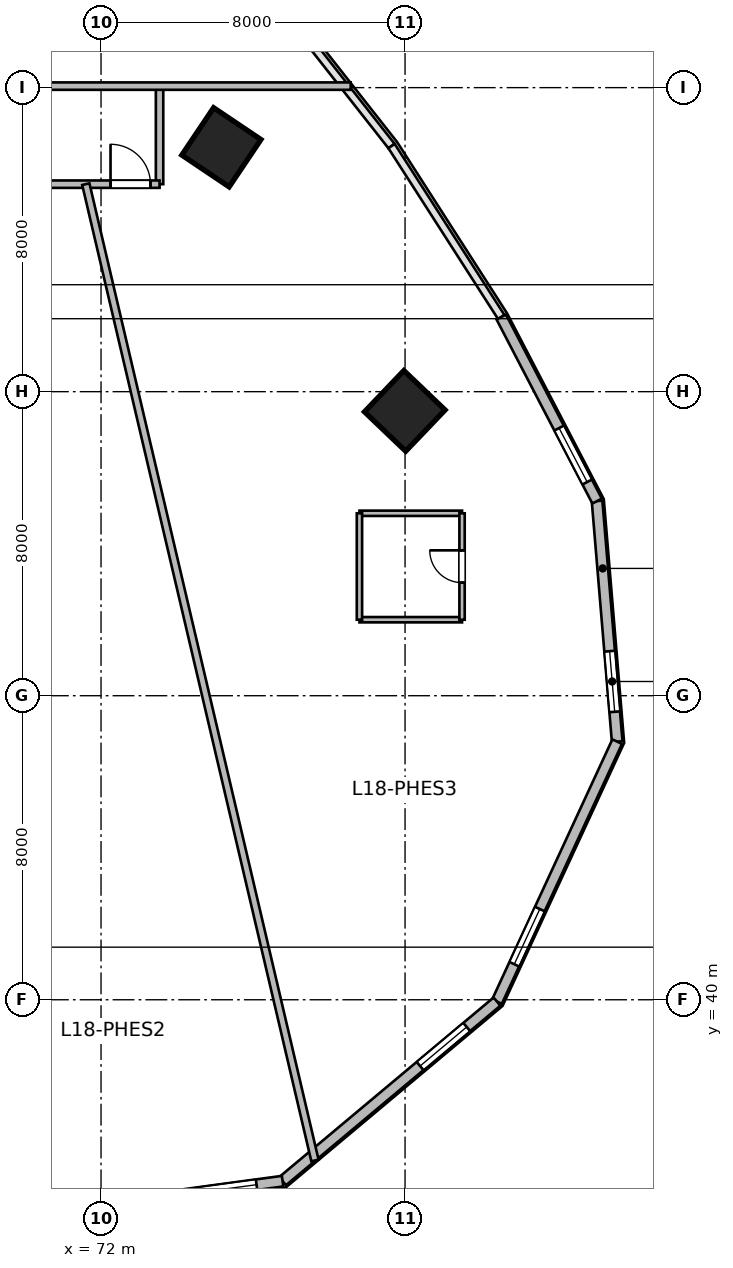
"""IFC4 building model, lengths in metres.
Left out: names, types, materials, properties, quantities, classifications, styles, units other than length and angle.
Written with IfcOpenShell. Run it as: python <this file> out.ifc"""

import sys

from ifc_helpers import new_model, si_unit, direction, frame, frame_2d, origin, origin_2d, place, context, subcontext, project, spatial, rectangle, extrude, source, transform, mapped, element, fill, save


model = new_model("IFC4")
c1 = context("Model", 3, precision=1e-05, world=origin(), true_north=direction((0.0, 1.0)))
c2 = subcontext(c1, "Body", "Model", "MODEL_VIEW")
j1 = project(units=[si_unit("LENGTHUNIT", "METRE"), si_unit("PLANEANGLEUNIT", "RADIAN")], contexts=[c1])
p1 = place(None, origin())
s1 = spatial("IfcSite", under=j1, at=p1, CompositionType="ELEMENT")
p2 = place(p1, origin())
s2 = spatial("IfcBuilding", under=s1, at=p2, CompositionType="ELEMENT")
p3 = place(p2, frame((0.0, 0.0, 78.6)))
s3 = spatial("IfcBuildingStorey", under=s2, at=p3, CompositionType="ELEMENT", Elevation=78.6)
m1 = source(origin(), c2, "Body", "SweptSolid", [
    extrude(rectangle(XDim=1.5, YDim=1.5, at=origin_2d()), origin(), (0.0, 0.0, 1.0), 3.6),
])
for number, where, z_axis, x_axis in (
    (1, (75.167, 62.43, 0.0), (0.0, 0.0, 1.0), (0.558, 0.83, 0.0)),
    (2, (79.993, 55.494, 0.0), (0.0, 0.0, 1.0), (0.691, 0.723, 0.0)),
):
    element("IfcColumn", number, at=place(p3, frame(where, z_axis=z_axis, x_axis=x_axis)), inside=s3, PredefinedType="COLUMN", context=c2, shape_type="MappedRepresentation", body=[
        mapped(m1, transform((0.0, 0.0, 0.0), scale=1.0)),
    ])
m2 = source(origin(), c2, "Body", "SweptSolid", [
    extrude(rectangle(XDim=6.353, YDim=0.28, at=frame_2d((3.176, 0.0))), origin(), (0.0, 0.0, 1.0), 3.36),
])
p4 = place(p3, frame((85.053, 53.122, 0.0), z_axis=(0.0, 0.0, 1.0), x_axis=(0.083319001377, -0.996522926986, 0.0)))
e3 = element("IfcWall", 3, at=p4, inside=s3, PredefinedType="SOLIDWALL", context=c2, shape_type="MappedRepresentation", body=[
    mapped(m2, transform((0.0, 0.0, 0.0), scale=1.0)),
])
p5 = place(p4, frame((3.964, 0.0, 0.95)))
e4 = element("IfcOpeningElement", 4, at=p5, cuts=e3, PredefinedType="OPENING", context=c2, shape_type="SweptSolid", body=[
    extrude(rectangle(XDim=1.6, YDim=1.9, at=frame_2d((0.8, 0.95))), frame((0.0, 0.15, 0.0), z_axis=(0.0, -1.0, 0.0), x_axis=(1.0, 0.0, 0.0)), (0.0, 0.0, 1.0), 0.3),
])
m3 = source(origin(), c2, "Body", "SweptSolid", [
    extrude(rectangle(XDim=7.536, YDim=0.28, at=frame_2d((3.768, 0.0))), origin(), (0.0, 0.0, 1.0), 3.36),
])
p6 = place(p3, frame((85.582, 46.792, 0.0), z_axis=(0.0, 0.0, 1.0), x_axis=(-0.41964973873, -0.907686122393, 0.0)))
e5 = element("IfcWall", 5, at=p6, inside=s3, PredefinedType="SOLIDWALL", context=c2, shape_type="MappedRepresentation", body=[
    mapped(m3, transform((0.0, 0.0, 0.0), scale=1.0)),
])
p7 = place(p6, frame((4.852, 0.0, 0.95)))
e6 = element("IfcOpeningElement", 6, at=p7, cuts=e5, PredefinedType="OPENING", context=c2, shape_type="SweptSolid", body=[
    extrude(rectangle(XDim=1.6, YDim=1.9, at=frame_2d((0.8, 0.95))), frame((0.0, 0.15, 0.0), z_axis=(0.0, -1.0, 0.0), x_axis=(1.0, 0.0, 0.0)), (0.0, 0.0, 1.0), 0.3),
])
m4 = source(origin(), c2, "Body", "SweptSolid", [
    extrude(rectangle(XDim=7.359, YDim=0.28, at=frame_2d((3.679, 0.0))), origin(), (0.0, 0.0, 1.0), 3.36),
])
p8 = place(p3, frame((82.42, 39.951, 0.0), z_axis=(0.0, 0.0, 1.0), x_axis=(-0.766737165543, -0.641961150675, 0.0)))
e7 = element("IfcWall", 7, at=p8, inside=s3, PredefinedType="SOLIDWALL", context=c2, shape_type="MappedRepresentation", body=[
    mapped(m4, transform((0.0, 0.0, 0.0), scale=1.0)),
])
p9 = place(p8, frame((1.04, 0.0, 0.95)))
e8 = element("IfcOpeningElement", 8, at=p9, cuts=e7, PredefinedType="OPENING", context=c2, shape_type="SweptSolid", body=[
    extrude(rectangle(XDim=1.6, YDim=1.9, at=frame_2d((0.8, 0.95))), frame((0.0, 0.15, 0.0), z_axis=(0.0, -1.0, 0.0), x_axis=(1.0, 0.0, 0.0)), (0.0, 0.0, 1.0), 0.3),
])
m5 = source(origin(), c2, "Body", "SweptSolid", [
    extrude(rectangle(XDim=5.967, YDim=0.28, at=frame_2d((2.984, 0.0))), origin(), (0.0, 0.0, 1.0), 3.36),
])
p10 = place(p3, frame((76.777, 35.227, 0.0), z_axis=(0.0, 0.0, 1.0), x_axis=(-0.990927009341, -0.134401124099, 0.0)))
e9 = element("IfcWall", 9, at=p10, inside=s3, PredefinedType="SOLIDWALL", context=c2, shape_type="MappedRepresentation", body=[
    mapped(m5, transform((0.0, 0.0, 0.0), scale=1.0)),
])
p11 = place(p10, frame((0.692, 0.0, 0.95)))
e10 = element("IfcOpeningElement", 10, at=p11, cuts=e9, PredefinedType="OPENING", context=c2, shape_type="SweptSolid", body=[
    extrude(rectangle(XDim=1.6, YDim=1.9, at=frame_2d((0.8, 0.95))), frame((0.0, 0.15, 0.0), z_axis=(0.0, -1.0, 0.0), x_axis=(1.0, 0.0, 0.0)), (0.0, 0.0, 1.0), 0.3),
])
m6 = source(origin(), c2, "Body", "SweptSolid", [
    extrude(rectangle(XDim=5.222, YDim=0.28, at=frame_2d((2.611, 0.0))), origin(), (0.0, 0.0, 1.0), 3.36),
])
p12 = place(p3, frame((70.864, 34.425, 0.0), z_axis=(0.0, 0.0, 1.0), x_axis=(-0.761900099546, 0.647694556339, 0.0)))
e11 = element("IfcWall", 11, at=p12, inside=s3, PredefinedType="SOLIDWALL", context=c2, shape_type="MappedRepresentation", body=[
    mapped(m6, transform((0.0, 0.0, 0.0), scale=1.0)),
])
p13 = place(p12, frame((0.506, 0.0, 0.95)))
e12 = element("IfcOpeningElement", 12, at=p13, cuts=e11, PredefinedType="OPENING", context=c2, shape_type="SweptSolid", body=[
    extrude(rectangle(XDim=1.6, YDim=1.9, at=frame_2d((0.8, 0.95))), frame((0.0, 0.15, 0.0), z_axis=(0.0, -1.0, 0.0), x_axis=(1.0, 0.0, 0.0)), (0.0, 0.0, 1.0), 0.3),
])
m7 = source(origin(), c2, "Body", "SweptSolid", [
    extrude(rectangle(XDim=5.459, YDim=0.28, at=frame_2d((2.73, 0.0))), origin(), (0.0, 0.0, 1.0), 3.36),
])
p14 = place(p3, frame((82.532, 57.965, 0.0), z_axis=(0.0, 0.0, 1.0), x_axis=(0.461768054321, -0.887000712518, 0.0)))
e13 = element("IfcWall", 13, at=p14, inside=s3, PredefinedType="SOLIDWALL", context=c2, shape_type="MappedRepresentation", body=[
    mapped(m7, transform((0.0, 0.0, 0.0), scale=1.0)),
])
p15 = place(p14, frame((3.295, 0.0, 0.95)))
e14 = element("IfcOpeningElement", 14, at=p15, cuts=e13, PredefinedType="OPENING", context=c2, shape_type="SweptSolid", body=[
    extrude(rectangle(XDim=1.6, YDim=1.9, at=frame_2d((0.8, 0.95))), frame((0.0, 0.15, 0.0), z_axis=(0.0, -1.0, 0.0), x_axis=(1.0, 0.0, 0.0)), (0.0, 0.0, 1.0), 0.3),
])
m8 = source(origin(), c2, "Body", "SweptSolid", [
    extrude(rectangle(XDim=2.58, YDim=0.195, at=frame_2d((1.29, 0.0))), origin(), (0.0, 0.0, 1.0), 2.88),
])
p16 = place(p3, frame((73.54, 61.46, 0.0), z_axis=(0.0, 0.0, 1.0), x_axis=(0.0, 1.0, 0.0)))
e15 = element("IfcWall", 15, at=p16, inside=s3, PredefinedType="PARTITIONING", context=c2, shape_type="MappedRepresentation", body=[
    mapped(m8, transform((0.0, 0.0, 0.0), scale=1.0)),
])
m9 = source(origin(), c2, "Body", "SweptSolid", [
    extrude(rectangle(XDim=16.93, YDim=0.195, at=frame_2d((8.465, 0.0))), origin(), (0.0, 0.0, 1.0), 3.36),
])
p17 = place(p3, frame((61.64, 64.04, 0.0), z_axis=(0.0, 0.0, 1.0), x_axis=(1.0, 0.0, 0.0)))
e16 = element("IfcWall", 16, at=p17, inside=s3, PredefinedType="PARTITIONING", context=c2, shape_type="MappedRepresentation", body=[
    mapped(m9, transform((0.0, 0.0, 0.0), scale=1.0)),
])
p18 = place(p17, frame((7.94, 0.0, 0.0)))
e17 = element("IfcOpeningElement", 17, at=p18, cuts=e16, PredefinedType="OPENING", context=c2, shape_type="SweptSolid", body=[
    extrude(rectangle(XDim=1.05, YDim=2.15, at=frame_2d((0.525, 1.075))), frame((0.0, 0.107, 0.0), z_axis=(0.0, -1.0, 0.0), x_axis=(1.0, 0.0, 0.0)), (0.0, 0.0, 1.0), 0.215),
])
m10 = source(origin(), c2, "Body", "SweptSolid", [
    extrude(rectangle(XDim=11.9, YDim=0.195, at=frame_2d((5.95, 0.0))), origin(), (0.0, 0.0, 1.0), 3.36),
])
p19 = place(p3, frame((61.64, 61.46, 0.0), z_axis=(0.0, 0.0, 1.0), x_axis=(1.0, 0.0, 0.0)))
e18 = element("IfcWall", 18, at=p19, inside=s3, PredefinedType="PARTITIONING", context=c2, shape_type="MappedRepresentation", body=[
    mapped(m10, transform((0.0, 0.0, 0.0), scale=1.0)),
])
p20 = place(p19, frame((3.61, 0.0, 0.0)))
e19 = element("IfcOpeningElement", 19, at=p20, cuts=e18, PredefinedType="OPENING", context=c2, shape_type="SweptSolid", body=[
    extrude(rectangle(XDim=1.05, YDim=2.15, at=frame_2d((0.525, 1.075))), frame((0.0, 0.107, 0.0), z_axis=(0.0, -1.0, 0.0), x_axis=(1.0, 0.0, 0.0)), (0.0, 0.0, 1.0), 0.215),
])
p21 = place(p19, frame((5.425, 0.0, 0.0)))
e20 = element("IfcOpeningElement", 20, at=p21, cuts=e18, PredefinedType="OPENING", context=c2, shape_type="SweptSolid", body=[
    extrude(rectangle(XDim=1.05, YDim=2.15, at=frame_2d((0.525, 1.075))), frame((0.0, 0.107, 0.0), z_axis=(0.0, -1.0, 0.0), x_axis=(1.0, 0.0, 0.0)), (0.0, 0.0, 1.0), 0.215),
])
p22 = place(p19, frame((10.61, 0.0, 0.0)))
e21 = element("IfcOpeningElement", 21, at=p22, cuts=e18, PredefinedType="OPENING", context=c2, shape_type="SweptSolid", body=[
    extrude(rectangle(XDim=1.05, YDim=2.15, at=frame_2d((0.525, 1.075))), frame((0.0, 0.107, 0.0), z_axis=(0.0, -1.0, 0.0), x_axis=(1.0, 0.0, 0.0)), (0.0, 0.0, 1.0), 0.215),
])
m11 = source(origin(), c2, "Body", "SweptSolid", [
    extrude(rectangle(XDim=26.387, YDim=0.195, at=frame_2d((13.194, 0.0))), origin(), (0.0, 0.0, 1.0), 2.88),
])
p23 = place(p3, frame((77.629, 35.771, 0.0), z_axis=(0.0, 0.0, 1.0), x_axis=(-0.228490600532, 0.97354611882, 0.0)))
e22 = element("IfcWall", 22, at=p23, inside=s3, PredefinedType="PARTITIONING", context=c2, shape_type="MappedRepresentation", body=[
    mapped(m11, transform((0.0, 0.0, 0.0), scale=1.0)),
])
m12 = source(origin(), c2, "Body", "SweptSolid", [
    extrude(rectangle(XDim=2.7, YDim=0.14, at=frame_2d((1.35, 0.0))), origin(), (0.0, 0.0, 1.0), 3.36),
])
for number, where, z_axis, x_axis in (
    (23, (78.8, 52.8, 0.0), (0.0, 0.0, 1.0), (1.0, 0.0, 0.0)),
    (24, (78.8, 50.0, 0.0), (0.0, 0.0, 1.0), (1.0, 0.0, 0.0)),
):
    element("IfcWall", number, at=place(p3, frame(where, z_axis=z_axis, x_axis=x_axis)), inside=s3, PredefinedType="PARTITIONING", context=c2, shape_type="MappedRepresentation", body=[
        mapped(m12, transform((0.0, 0.0, 0.0), scale=1.0)),
    ])
m13 = source(origin(), c2, "Body", "SweptSolid", [
    extrude(rectangle(XDim=2.8, YDim=0.14, at=frame_2d((1.4, 0.0))), origin(), (0.0, 0.0, 1.0), 3.36),
])
p24 = place(p3, frame((78.8, 50.0, 0.0), z_axis=(0.0, 0.0, 1.0), x_axis=(0.0, 1.0, 0.0)))
e25 = element("IfcWall", 25, at=p24, inside=s3, PredefinedType="PARTITIONING", context=c2, shape_type="MappedRepresentation", body=[
    mapped(m13, transform((0.0, 0.0, 0.0), scale=1.0)),
])
p25 = place(p3, frame((81.5, 50.0, 0.0), z_axis=(0.0, 0.0, 1.0), x_axis=(0.0, 1.0, 0.0)))
e26 = element("IfcWall", 26, at=p25, inside=s3, PredefinedType="PARTITIONING", context=c2, shape_type="MappedRepresentation", body=[
    mapped(m13, transform((0.0, 0.0, 0.0), scale=1.0)),
])
p26 = place(p25, frame((0.975, 0.0, 0.0)))
e27 = element("IfcOpeningElement", 27, at=p26, cuts=e26, PredefinedType="OPENING", context=c2, shape_type="SweptSolid", body=[
    extrude(rectangle(XDim=0.85, YDim=2.05, at=frame_2d((0.425, 1.025))), frame((0.0, 0.08, 0.0), z_axis=(0.0, -1.0, 0.0), x_axis=(1.0, 0.0, 0.0)), (0.0, 0.0, 1.0), 0.16),
])
m14 = source(origin(), c2, "Body", "SweptSolid", [
    extrude(rectangle(XDim=1.6, YDim=1.9, at=frame_2d((0.8, 0.95))), frame((0.0, 0.03, 0.0), z_axis=(0.0, -1.0, 0.0), x_axis=(1.0, 0.0, 0.0)), (0.0, 0.0, 1.0), 0.06),
])
p27 = place(p5, origin())
e28 = element("IfcWindow", 28, at=p27, inside=s3, PartitioningType="SINGLE_PANEL", PredefinedType="WINDOW", context=c2, shape_type="MappedRepresentation", body=[
    mapped(m14, transform((0.0, 0.0, 0.0), scale=1.0)),
])
fill(e4, e28)
p28 = place(p7, origin())
e29 = element("IfcWindow", 29, at=p28, inside=s3, PartitioningType="SINGLE_PANEL", PredefinedType="WINDOW", context=c2, shape_type="MappedRepresentation", body=[
    mapped(m14, transform((0.0, 0.0, 0.0), scale=1.0)),
])
fill(e6, e29)
p29 = place(p9, origin())
e30 = element("IfcWindow", 30, at=p29, inside=s3, PartitioningType="SINGLE_PANEL", PredefinedType="WINDOW", context=c2, shape_type="MappedRepresentation", body=[
    mapped(m14, transform((0.0, 0.0, 0.0), scale=1.0)),
])
fill(e8, e30)
p30 = place(p11, origin())
e31 = element("IfcWindow", 31, at=p30, inside=s3, PartitioningType="SINGLE_PANEL", PredefinedType="WINDOW", context=c2, shape_type="MappedRepresentation", body=[
    mapped(m14, transform((0.0, 0.0, 0.0), scale=1.0)),
])
fill(e10, e31)
p31 = place(p15, origin())
e32 = element("IfcWindow", 32, at=p31, inside=s3, PartitioningType="SINGLE_PANEL", PredefinedType="WINDOW", context=c2, shape_type="MappedRepresentation", body=[
    mapped(m14, transform((0.0, 0.0, 0.0), scale=1.0)),
])
fill(e14, e32)
m15 = source(origin(), c2, "Body", "SweptSolid", [
    extrude(rectangle(XDim=1.05, YDim=2.15, at=frame_2d((0.525, 1.075))), frame((0.0, 0.025, 0.0), z_axis=(0.0, -1.0, 0.0), x_axis=(1.0, 0.0, 0.0)), (0.0, 0.0, 1.0), 0.05),
])
p32 = place(p22, origin())
e33 = element("IfcDoor", 33, at=p32, inside=s3, OperationType="SINGLE_SWING_LEFT", PredefinedType="DOOR", context=c2, shape_type="MappedRepresentation", body=[
    mapped(m15, transform((0.0, 0.0, 0.0), scale=1.0)),
])
fill(e21, e33)
m16 = source(origin(), c2, "Body", "SweptSolid", [
    extrude(rectangle(XDim=0.85, YDim=2.05, at=frame_2d((0.425, 1.025))), frame((0.0, 0.025, 0.0), z_axis=(0.0, -1.0, 0.0), x_axis=(1.0, 0.0, 0.0)), (0.0, 0.0, 1.0), 0.05),
])
p33 = place(p26, origin())
e34 = element("IfcDoor", 34, at=p33, inside=s3, OperationType="SINGLE_SWING_RIGHT", PredefinedType="DOOR", context=c2, shape_type="MappedRepresentation", body=[
    mapped(m16, transform((0.0, 0.0, 0.0), scale=1.0)),
])
fill(e27, e34)
save(model, sys.argv[1])
